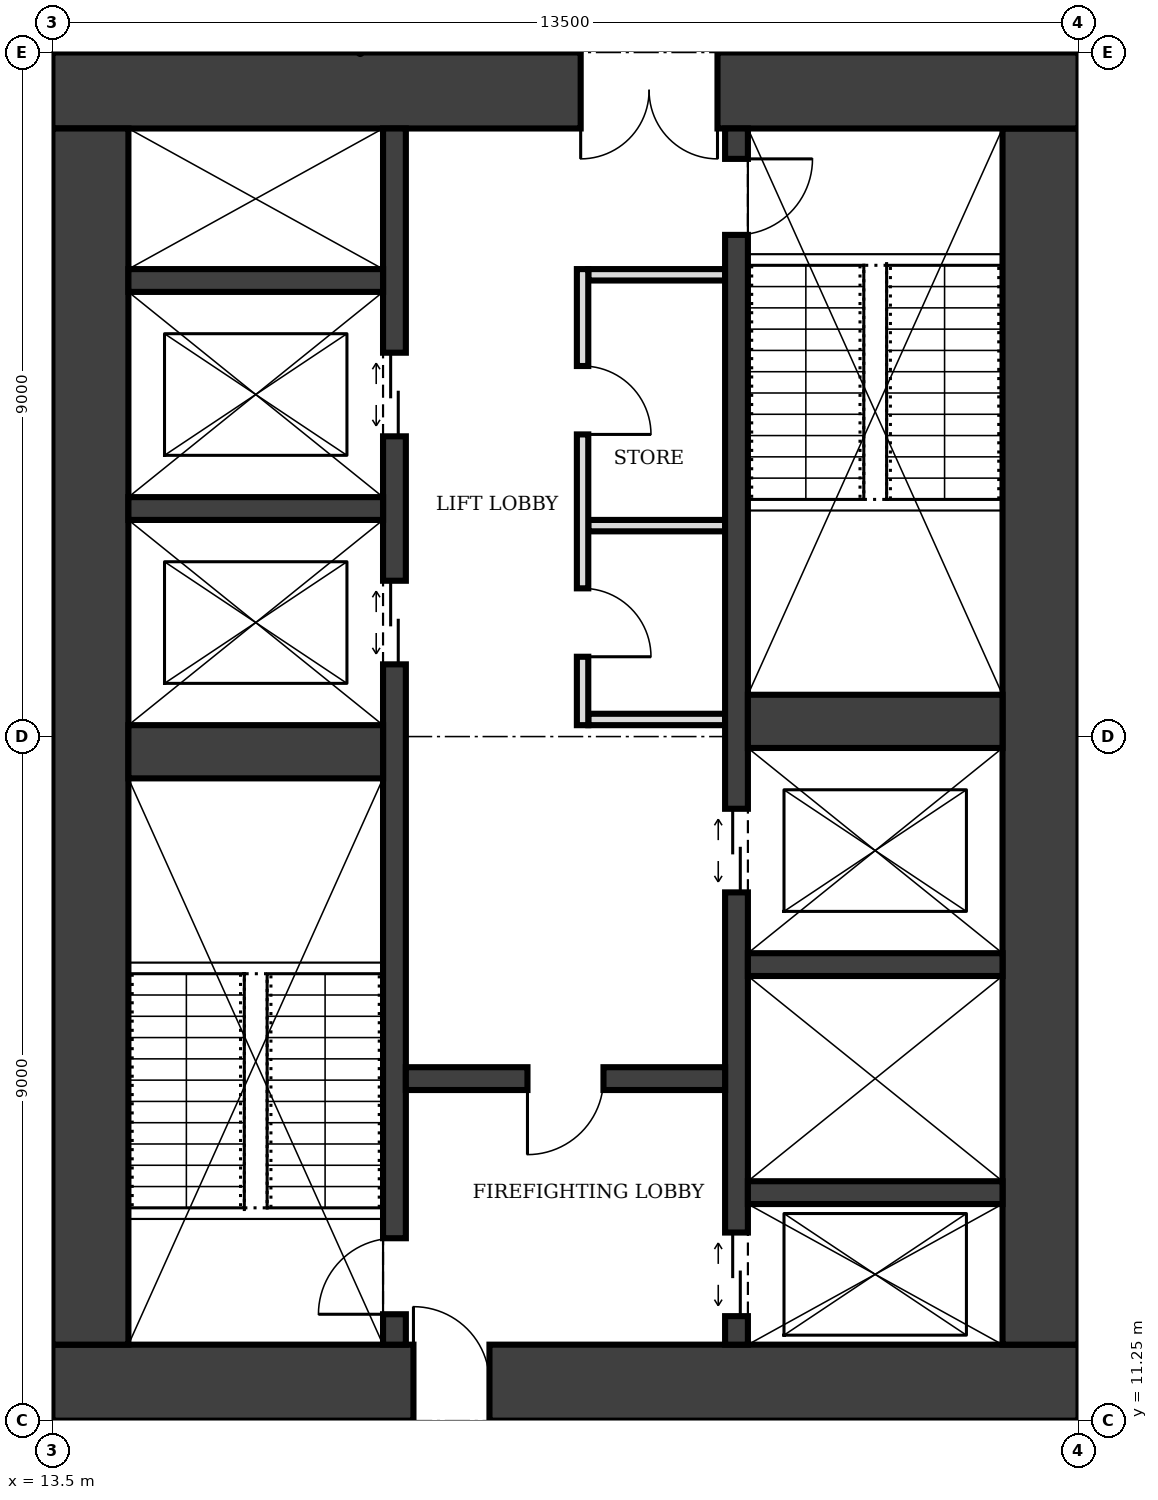
"""IFC4 building model, lengths in metres.
Left out: names, types, materials, properties, quantities, classifications, styles, units other than length and angle.
Written with IfcOpenShell. Run it as: python <this file> out.ifc"""

import sys

from ifc_helpers import new_model, si_unit, direction, frame, frame_2d, origin, place, context, subcontext, project, spatial, rectangle, extrude, element, fill, save


model = new_model("IFC4")
c1 = context("Model", 3, precision=1e-05, world=origin(), true_north=direction((0.0, 1.0)))
c2 = subcontext(c1, "Body", "Model", "MODEL_VIEW")
j1 = project(units=[si_unit("LENGTHUNIT", "METRE"), si_unit("PLANEANGLEUNIT", "RADIAN")], contexts=[c1])
p1 = place(None, origin())
s1 = spatial("IfcSite", under=j1, at=p1, CompositionType="ELEMENT")
p2 = place(p1, origin())
s2 = spatial("IfcBuilding", under=s1, at=p2, CompositionType="ELEMENT")
p3 = place(p2, frame((0.0, 0.0, 41.0)))
s3 = spatial("IfcBuildingStorey", under=s2, at=p3, CompositionType="ELEMENT", Elevation=41.0)
p4 = place(p3, frame((13.5, 11.75, 0.0), z_axis=(0.0, 0.0, 1.0), x_axis=(1.0, 0.0, 0.0)))
e1 = element("IfcWall", 1, at=p4, inside=s3, PredefinedType="SHEAR", context=c2, shape_type="SweptSolid", body=[
    extrude(rectangle(XDim=13.5, YDim=1.0, at=frame_2d((6.75, 0.0))), origin(), (0.0, 0.0, 1.0), 4.0),
])
p5 = place(p4, frame((4.75, 0.0, 0.0)))
e2 = element("IfcOpeningElement", 2, at=p5, cuts=e1, PredefinedType="OPENING", context=c2, shape_type="SweptSolid", body=[
    extrude(rectangle(XDim=1.0, YDim=2.1, at=frame_2d((0.5, 1.05))), frame((0.0, 0.51, 0.0), z_axis=(0.0, -1.0, 0.0), x_axis=(1.0, 0.0, 0.0)), (0.0, 0.0, 1.0), 1.02),
])
p6 = place(p3, frame((26.5, 12.25, 0.0), z_axis=(0.0, 0.0, 1.0), x_axis=(0.0, 1.0, 0.0)))
e3 = element("IfcWall", 3, at=p6, inside=s3, PredefinedType="SHEAR", context=c2, shape_type="SweptSolid", body=[
    extrude(rectangle(XDim=16.0, YDim=1.0, at=frame_2d((8.0, 0.0))), origin(), (0.0, 0.0, 1.0), 4.0),
])
p7 = place(p3, frame((27.0, 28.75, 0.0), z_axis=(0.0, 0.0, 1.0), x_axis=(-1.0, 0.0, 0.0)))
e4 = element("IfcWall", 4, at=p7, inside=s3, PredefinedType="SHEAR", context=c2, shape_type="SweptSolid", body=[
    extrude(rectangle(XDim=13.5, YDim=1.0, at=frame_2d((6.75, 0.0))), origin(), (0.0, 0.0, 1.0), 4.0),
])
p8 = place(p7, frame((4.75, 0.0, 0.0)))
e5 = element("IfcOpeningElement", 5, at=p8, cuts=e4, PredefinedType="OPENING", context=c2, shape_type="SweptSolid", body=[
    extrude(rectangle(XDim=1.8, YDim=2.1, at=frame_2d((0.9, 1.05))), frame((0.0, 0.51, 0.0), z_axis=(0.0, -1.0, 0.0), x_axis=(1.0, 0.0, 0.0)), (0.0, 0.0, 1.0), 1.02),
])
p9 = place(p3, frame((14.0, 28.25, 0.0), z_axis=(0.0, 0.0, 1.0), x_axis=(0.0, -1.0, 0.0)))
e6 = element("IfcWall", 6, at=p9, inside=s3, PredefinedType="SHEAR", context=c2, shape_type="SweptSolid", body=[
    extrude(rectangle(XDim=16.0, YDim=1.0, at=frame_2d((8.0, 0.0))), origin(), (0.0, 0.0, 1.0), 4.0),
])
p10 = place(p3, frame((18.0, 12.25, 0.0), z_axis=(0.0, 0.0, 1.0), x_axis=(0.0, 1.0, 0.0)))
e7 = element("IfcWall", 7, at=p10, inside=s3, PredefinedType="SHEAR", context=c2, shape_type="SweptSolid", body=[
    extrude(rectangle(XDim=16.0, YDim=0.3, at=frame_2d((8.0, 0.0))), origin(), (0.0, 0.0, 1.0), 4.0),
])
p11 = place(p10, frame((0.4, 0.0, 0.0)))
e8 = element("IfcOpeningElement", 8, at=p11, cuts=e7, PredefinedType="OPENING", context=c2, shape_type="SweptSolid", body=[
    extrude(rectangle(XDim=1.0, YDim=2.1, at=frame_2d((0.5, 1.05))), frame((0.0, 0.16, 0.0), z_axis=(0.0, -1.0, 0.0), x_axis=(1.0, 0.0, 0.0)), (0.0, 0.0, 1.0), 0.32),
])
p12 = place(p10, frame((8.95, 0.0, 0.0)))
e9 = element("IfcOpeningElement", 9, at=p12, cuts=e7, PredefinedType="OPENING", context=c2, shape_type="SweptSolid", body=[
    extrude(rectangle(XDim=1.1, YDim=2.1, at=frame_2d((0.55, 1.05))), frame((0.0, 0.16, 0.0), z_axis=(0.0, -1.0, 0.0), x_axis=(1.0, 0.0, 0.0)), (0.0, 0.0, 1.0), 0.32),
])
p13 = place(p10, frame((11.95, 0.0, 0.0)))
e10 = element("IfcOpeningElement", 10, at=p13, cuts=e7, PredefinedType="OPENING", context=c2, shape_type="SweptSolid", body=[
    extrude(rectangle(XDim=1.1, YDim=2.1, at=frame_2d((0.55, 1.05))), frame((0.0, 0.16, 0.0), z_axis=(0.0, -1.0, 0.0), x_axis=(1.0, 0.0, 0.0)), (0.0, 0.0, 1.0), 0.32),
])
p14 = place(p3, frame((22.5, 12.25, 0.0), z_axis=(0.0, 0.0, 1.0), x_axis=(0.0, 1.0, 0.0)))
e11 = element("IfcWall", 11, at=p14, inside=s3, PredefinedType="SHEAR", context=c2, shape_type="SweptSolid", body=[
    extrude(rectangle(XDim=16.0, YDim=0.3, at=frame_2d((8.0, 0.0))), origin(), (0.0, 0.0, 1.0), 4.0),
])
p15 = place(p14, frame((14.6, 0.0, 0.0)))
e12 = element("IfcOpeningElement", 12, at=p15, cuts=e11, PredefinedType="OPENING", context=c2, shape_type="SweptSolid", body=[
    extrude(rectangle(XDim=1.0, YDim=2.1, at=frame_2d((0.5, 1.05))), frame((0.0, 0.16, 0.0), z_axis=(0.0, -1.0, 0.0), x_axis=(1.0, 0.0, 0.0)), (0.0, 0.0, 1.0), 0.32),
])
p16 = place(p14, frame((0.375, 0.0, 0.0)))
e13 = element("IfcOpeningElement", 13, at=p16, cuts=e11, PredefinedType="OPENING", context=c2, shape_type="SweptSolid", body=[
    extrude(rectangle(XDim=1.1, YDim=2.1, at=frame_2d((0.55, 1.05))), frame((0.0, 0.16, 0.0), z_axis=(0.0, -1.0, 0.0), x_axis=(1.0, 0.0, 0.0)), (0.0, 0.0, 1.0), 0.32),
])
p17 = place(p14, frame((5.95, 0.0, 0.0)))
e14 = element("IfcOpeningElement", 14, at=p17, cuts=e11, PredefinedType="OPENING", context=c2, shape_type="SweptSolid", body=[
    extrude(rectangle(XDim=1.1, YDim=2.1, at=frame_2d((0.55, 1.05))), frame((0.0, 0.16, 0.0), z_axis=(0.0, -1.0, 0.0), x_axis=(1.0, 0.0, 0.0)), (0.0, 0.0, 1.0), 0.32),
])
p18 = place(p3, frame((14.5, 20.05, 0.0), z_axis=(0.0, 0.0, 1.0), x_axis=(1.0, 0.0, 0.0)))
e15 = element("IfcWall", 15, at=p18, inside=s3, PredefinedType="SHEAR", context=c2, shape_type="SweptSolid", body=[
    extrude(rectangle(XDim=3.35, YDim=0.7, at=frame_2d((1.675, 0.0))), origin(), (0.0, 0.0, 1.0), 4.0),
])
p19 = place(p3, frame((18.15, 15.75, 0.0), z_axis=(0.0, 0.0, 1.0), x_axis=(1.0, 0.0, 0.0)))
e16 = element("IfcWall", 16, at=p19, inside=s3, PredefinedType="SHEAR", context=c2, shape_type="SweptSolid", body=[
    extrude(rectangle(XDim=4.2, YDim=0.3, at=frame_2d((2.1, 0.0))), origin(), (0.0, 0.0, 1.0), 4.0),
])
p20 = place(p19, frame((1.6, 0.0, 0.0)))
e17 = element("IfcOpeningElement", 17, at=p20, cuts=e16, PredefinedType="OPENING", context=c2, shape_type="SweptSolid", body=[
    extrude(rectangle(XDim=1.0, YDim=2.1, at=frame_2d((0.5, 1.05))), frame((0.0, 0.16, 0.0), z_axis=(0.0, -1.0, 0.0), x_axis=(1.0, 0.0, 0.0)), (0.0, 0.0, 1.0), 0.32),
])
for number, where, z_axis, x_axis in (
    (18, (22.65, 14.25, 0.0), (0.0, 0.0, 1.0), (1.0, 0.0, 0.0)),
    (19, (22.65, 17.25, 0.0), (0.0, 0.0, 1.0), (1.0, 0.0, 0.0)),
):
    element("IfcWall", number, at=place(p3, frame(where, z_axis=z_axis, x_axis=x_axis)), inside=s3, PredefinedType="SHEAR", context=c2, shape_type="SweptSolid", body=[
        extrude(rectangle(XDim=3.35, YDim=0.3, at=frame_2d((1.675, 0.0))), origin(), (0.0, 0.0, 1.0), 4.0),
    ])
p21 = place(p3, frame((22.65, 20.45, 0.0), z_axis=(0.0, 0.0, 1.0), x_axis=(1.0, 0.0, 0.0)))
e20 = element("IfcWall", 20, at=p21, inside=s3, PredefinedType="SHEAR", context=c2, shape_type="SweptSolid", body=[
    extrude(rectangle(XDim=3.35, YDim=0.7, at=frame_2d((1.675, 0.0))), origin(), (0.0, 0.0, 1.0), 4.0),
])
for number, where, z_axis, x_axis in (
    (21, (14.5, 23.25, 0.0), (0.0, 0.0, 1.0), (1.0, 0.0, 0.0)),
    (22, (14.5, 26.25, 0.0), (0.0, 0.0, 1.0), (1.0, 0.0, 0.0)),
):
    element("IfcWall", number, at=place(p3, frame(where, z_axis=z_axis, x_axis=x_axis)), inside=s3, PredefinedType="SHEAR", context=c2, shape_type="SweptSolid", body=[
        extrude(rectangle(XDim=3.35, YDim=0.3, at=frame_2d((1.675, 0.0))), origin(), (0.0, 0.0, 1.0), 4.0),
    ])
p22 = place(p3, frame((20.475, 20.4, 0.0), z_axis=(0.0, 0.0, 1.0), x_axis=(0.0, 1.0, 0.0)))
e23 = element("IfcWall", 23, at=p22, inside=s3, PredefinedType="PARTITIONING", context=c2, shape_type="SweptSolid", body=[
    extrude(rectangle(XDim=6.0, YDim=0.15, at=frame_2d((3.0, 0.0))), origin(), (0.0, 0.0, 1.0), 3.75),
])
p23 = place(p22, frame((0.9, 0.0, 0.0)))
e24 = element("IfcOpeningElement", 24, at=p23, cuts=e23, PredefinedType="OPENING", context=c2, shape_type="SweptSolid", body=[
    extrude(rectangle(XDim=0.9, YDim=2.1, at=frame_2d((0.45, 1.05))), frame((0.0, 0.085, 0.0), z_axis=(0.0, -1.0, 0.0), x_axis=(1.0, 0.0, 0.0)), (0.0, 0.0, 1.0), 0.17),
])
p24 = place(p22, frame((3.825, 0.0, 0.0)))
e25 = element("IfcOpeningElement", 25, at=p24, cuts=e23, PredefinedType="OPENING", context=c2, shape_type="SweptSolid", body=[
    extrude(rectangle(XDim=0.9, YDim=2.1, at=frame_2d((0.45, 1.05))), frame((0.0, 0.085, 0.0), z_axis=(0.0, -1.0, 0.0), x_axis=(1.0, 0.0, 0.0)), (0.0, 0.0, 1.0), 0.17),
])
for number, where, z_axis, x_axis in (
    (26, (20.55, 20.475, 0.0), (0.0, 0.0, 1.0), (1.0, 0.0, 0.0)),
    (27, (20.55, 23.025, 0.0), (0.0, 0.0, 1.0), (1.0, 0.0, 0.0)),
    (28, (20.55, 26.325, 0.0), (0.0, 0.0, 1.0), (1.0, 0.0, 0.0)),
):
    element("IfcWall", number, at=place(p3, frame(where, z_axis=z_axis, x_axis=x_axis)), inside=s3, PredefinedType="PARTITIONING", context=c2, shape_type="SweptSolid", body=[
        extrude(rectangle(XDim=1.8, YDim=0.15, at=frame_2d((0.9, 0.0))), origin(), (0.0, 0.0, 1.0), 3.75),
    ])
p25 = place(p5, origin())
e29 = element("IfcDoor", 29, at=p25, inside=s3, OperationType="SINGLE_SWING_LEFT", PredefinedType="DOOR", context=c2, shape_type="SweptSolid", body=[
    extrude(rectangle(XDim=1.0, YDim=2.1, at=frame_2d((0.5, 1.05))), frame((0.0, 0.025, 0.0), z_axis=(0.0, -1.0, 0.0), x_axis=(1.0, 0.0, 0.0)), (0.0, 0.0, 1.0), 0.05),
])
fill(e2, e29)
p26 = place(p8, origin())
e30 = element("IfcDoor", 30, at=p26, inside=s3, OperationType="DOUBLE_DOOR_SINGLE_SWING", PredefinedType="DOOR", context=c2, shape_type="SweptSolid", body=[
    extrude(rectangle(XDim=1.8, YDim=2.1, at=frame_2d((0.9, 1.05))), frame((0.0, 0.025, 0.0), z_axis=(0.0, -1.0, 0.0), x_axis=(1.0, 0.0, 0.0)), (0.0, 0.0, 1.0), 0.05),
])
fill(e5, e30)
p27 = place(p20, frame((1.0, 0.0, 0.0), z_axis=(0.0, 0.0, 1.0), x_axis=(-1.0, 0.0, 0.0)))
e31 = element("IfcDoor", 31, at=p27, inside=s3, OperationType="SINGLE_SWING_RIGHT", PredefinedType="DOOR", context=c2, shape_type="SweptSolid", body=[
    extrude(rectangle(XDim=1.0, YDim=2.1, at=frame_2d((0.5, 1.05))), frame((0.0, 0.025, 0.0), z_axis=(0.0, -1.0, 0.0), x_axis=(1.0, 0.0, 0.0)), (0.0, 0.0, 1.0), 0.05),
])
fill(e17, e31)
p28 = place(p11, origin())
e32 = element("IfcDoor", 32, at=p28, inside=s3, OperationType="SINGLE_SWING_LEFT", PredefinedType="DOOR", context=c2, shape_type="SweptSolid", body=[
    extrude(rectangle(XDim=1.0, YDim=2.1, at=frame_2d((0.5, 1.05))), frame((0.0, 0.025, 0.0), z_axis=(0.0, -1.0, 0.0), x_axis=(1.0, 0.0, 0.0)), (0.0, 0.0, 1.0), 0.05),
])
fill(e8, e32)
p29 = place(p15, frame((1.0, 0.0, 0.0), z_axis=(0.0, 0.0, 1.0), x_axis=(-1.0, 0.0, 0.0)))
e33 = element("IfcDoor", 33, at=p29, inside=s3, OperationType="SINGLE_SWING_LEFT", PredefinedType="DOOR", context=c2, shape_type="SweptSolid", body=[
    extrude(rectangle(XDim=1.0, YDim=2.1, at=frame_2d((0.5, 1.05))), frame((0.0, 0.025, 0.0), z_axis=(0.0, -1.0, 0.0), x_axis=(1.0, 0.0, 0.0)), (0.0, 0.0, 1.0), 0.05),
])
fill(e12, e33)
p30 = place(p16, origin())
e34 = element("IfcDoor", 34, at=p30, inside=s3, OperationType="DOUBLE_DOOR_SLIDING", PredefinedType="DOOR", context=c2, shape_type="SweptSolid", body=[
    extrude(rectangle(XDim=1.1, YDim=2.1, at=frame_2d((0.55, 1.05))), frame((0.0, 0.025, 0.0), z_axis=(0.0, -1.0, 0.0), x_axis=(1.0, 0.0, 0.0)), (0.0, 0.0, 1.0), 0.05),
])
fill(e13, e34)
p31 = place(p12, origin())
e35 = element("IfcDoor", 35, at=p31, inside=s3, OperationType="DOUBLE_DOOR_SLIDING", PredefinedType="DOOR", context=c2, shape_type="SweptSolid", body=[
    extrude(rectangle(XDim=1.1, YDim=2.1, at=frame_2d((0.55, 1.05))), frame((0.0, 0.025, 0.0), z_axis=(0.0, -1.0, 0.0), x_axis=(1.0, 0.0, 0.0)), (0.0, 0.0, 1.0), 0.05),
])
fill(e9, e35)
p32 = place(p13, origin())
e36 = element("IfcDoor", 36, at=p32, inside=s3, OperationType="DOUBLE_DOOR_SLIDING", PredefinedType="DOOR", context=c2, shape_type="SweptSolid", body=[
    extrude(rectangle(XDim=1.1, YDim=2.1, at=frame_2d((0.55, 1.05))), frame((0.0, 0.025, 0.0), z_axis=(0.0, -1.0, 0.0), x_axis=(1.0, 0.0, 0.0)), (0.0, 0.0, 1.0), 0.05),
])
fill(e10, e36)
p33 = place(p17, origin())
e37 = element("IfcDoor", 37, at=p33, inside=s3, OperationType="DOUBLE_DOOR_SLIDING", PredefinedType="DOOR", context=c2, shape_type="SweptSolid", body=[
    extrude(rectangle(XDim=1.1, YDim=2.1, at=frame_2d((0.55, 1.05))), frame((0.0, 0.025, 0.0), z_axis=(0.0, -1.0, 0.0), x_axis=(1.0, 0.0, 0.0)), (0.0, 0.0, 1.0), 0.05),
])
fill(e14, e37)
p34 = place(p23, frame((0.9, 0.0, 0.0), z_axis=(0.0, 0.0, 1.0), x_axis=(-1.0, 0.0, 0.0)))
e38 = element("IfcDoor", 38, at=p34, inside=s3, OperationType="SINGLE_SWING_RIGHT", PredefinedType="DOOR", context=c2, shape_type="SweptSolid", body=[
    extrude(rectangle(XDim=0.9, YDim=2.1, at=frame_2d((0.45, 1.05))), frame((0.0, 0.025, 0.0), z_axis=(0.0, -1.0, 0.0), x_axis=(1.0, 0.0, 0.0)), (0.0, 0.0, 1.0), 0.05),
])
fill(e24, e38)
p35 = place(p24, frame((0.9, 0.0, 0.0), z_axis=(0.0, 0.0, 1.0), x_axis=(-1.0, 0.0, 0.0)))
e39 = element("IfcDoor", 39, at=p35, inside=s3, OperationType="SINGLE_SWING_RIGHT", PredefinedType="DOOR", context=c2, shape_type="SweptSolid", body=[
    extrude(rectangle(XDim=0.9, YDim=2.1, at=frame_2d((0.45, 1.05))), frame((0.0, 0.025, 0.0), z_axis=(0.0, -1.0, 0.0), x_axis=(1.0, 0.0, 0.0)), (0.0, 0.0, 1.0), 0.05),
])
fill(e25, e39)
save(model, sys.argv[1])
